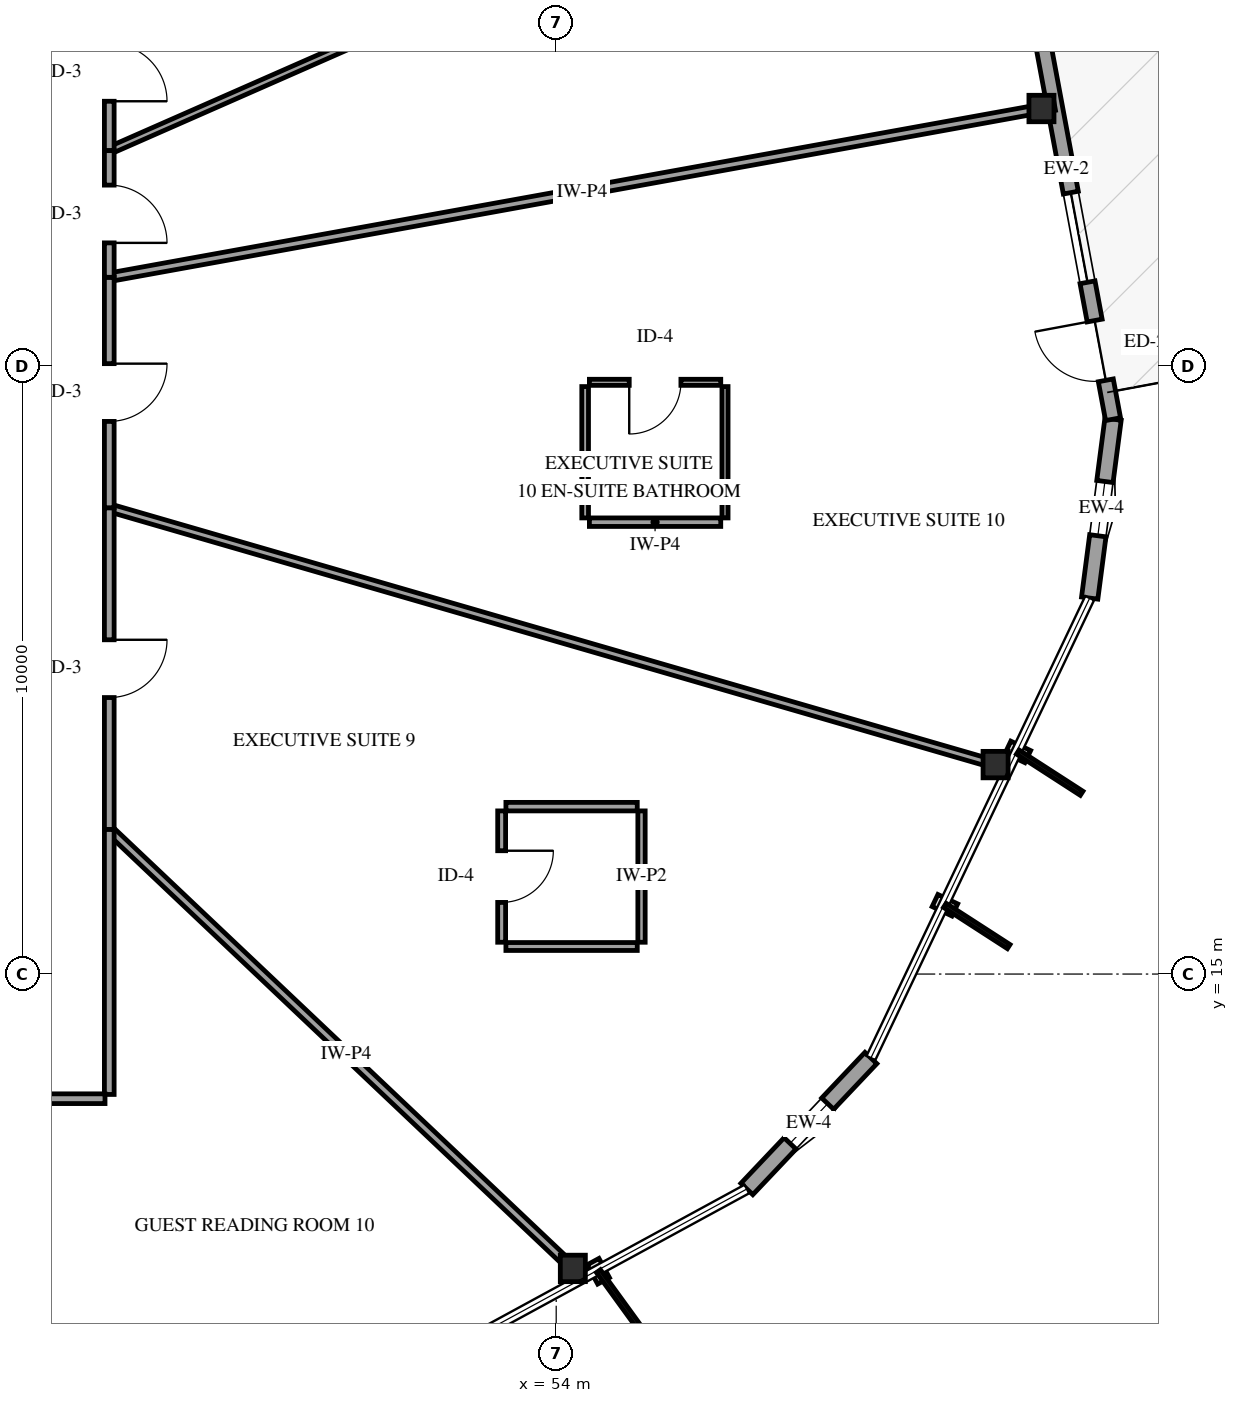
"""IFC4 building model, lengths in metres.
Left out: names, types, materials, properties, quantities, classifications, styles, units other than length and angle.
Written with IfcOpenShell. Run it as: python <this file> out.ifc"""

import sys

from ifc_helpers import new_model, si_unit, direction, frame, frame_2d, origin, origin_2d, place, context, subcontext, project, spatial, rectangle, i_section, extrude, element, fill, save


model = new_model("IFC4")
c1 = context("Model", 3, precision=1e-05, world=origin(), true_north=direction((0.0, 1.0)))
c2 = subcontext(c1, "Body", "Model", "MODEL_VIEW")
j1 = project(units=[si_unit("LENGTHUNIT", "METRE"), si_unit("PLANEANGLEUNIT", "RADIAN")], contexts=[c1])
p1 = place(None, origin())
s1 = spatial("IfcSite", under=j1, at=p1, CompositionType="ELEMENT")
p2 = place(p1, origin())
s2 = spatial("IfcBuilding", under=s1, at=p2, CompositionType="ELEMENT")
p3 = place(p2, frame((0.0, 0.0, 139.0)))
s3 = spatial("IfcBuildingStorey", under=s2, at=p3, CompositionType="ELEMENT", Elevation=139.0)
for number, where, z_axis, x_axis in (
    (1, (61.98, 29.234, -0.3), (0.0, 0.0, 1.0), (1.0, 0.0, 0.0)),
    (2, (54.274, 10.159, -0.3), (0.0, 0.0, 1.0), (1.0, 0.0, 0.0)),
    (3, (61.226, 18.444, -0.3), (0.0, 0.0, 1.0), (1.0, 0.0, 0.0)),
):
    element("IfcColumn", number, at=place(p3, frame(where, z_axis=z_axis, x_axis=x_axis)), inside=s3, PredefinedType="COLUMN", context=c2, shape_type="SweptSolid", body=[
        extrude(i_section(OverallWidth=0.412, OverallDepth=0.435, WebThickness=0.036, FlangeThickness=0.057, FilletRadius=0.038, at=origin_2d()), origin(), (0.0, 0.0, 1.0), 3.9),
    ])
p4 = place(p3, frame((57.135, 11.465, 0.0), z_axis=(0.0, 0.0, 1.0), x_axis=(0.687587127065, 0.726101881759, 0.0)))
e4 = element("IfcWall", 4, at=p4, inside=s3, PredefinedType="SOLIDWALL", context=c2, shape_type="SweptSolid", body=[
    extrude(rectangle(XDim=2.967, YDim=0.27, at=frame_2d((1.483, 0.0))), origin(), (0.0, 0.0, 1.0), 2.679),
])
p5 = place(p4, frame((1.033, 0.0, 0.75)))
e5 = element("IfcOpeningElement", 5, at=p5, cuts=e4, PredefinedType="OPENING", context=c2, shape_type="SweptSolid", body=[
    extrude(rectangle(XDim=0.9, YDim=1.5, at=frame_2d((0.45, 0.75))), frame((0.0, 0.145, 0.0), z_axis=(0.0, -1.0, 0.0), x_axis=(1.0, 0.0, 0.0)), (0.0, 0.0, 1.0), 0.29),
])
p6 = place(p3, frame((62.773, 21.183, 0.0), z_axis=(0.0, 0.0, 1.0), x_axis=(0.129532682457, 0.991575153065, 0.0)))
e6 = element("IfcWall", 6, at=p6, inside=s3, PredefinedType="SOLIDWALL", context=c2, shape_type="SweptSolid", body=[
    extrude(rectangle(XDim=2.967, YDim=0.27, at=frame_2d((1.483, 0.0))), origin(), (0.0, 0.0, 1.0), 2.679),
])
p7 = place(p6, frame((1.033, 0.0, 0.75)))
e7 = element("IfcOpeningElement", 7, at=p7, cuts=e6, PredefinedType="OPENING", context=c2, shape_type="SweptSolid", body=[
    extrude(rectangle(XDim=0.9, YDim=1.5, at=frame_2d((0.45, 0.75))), frame((0.0, 0.145, 0.0), z_axis=(0.0, -1.0, 0.0), x_axis=(1.0, 0.0, 0.0)), (0.0, 0.0, 1.0), 0.29),
])
p8 = place(p3, frame((63.158, 24.125, 0.0), z_axis=(0.0, 0.0, 1.0), x_axis=(-0.183274789928, 0.983061723076, 0.0)))
e8 = element("IfcWall", 8, at=p8, inside=s3, PredefinedType="SOLIDWALL", context=c2, shape_type="SweptSolid", body=[
    extrude(rectangle(XDim=8.376, YDim=0.25, at=frame_2d((4.188, 0.0))), origin(), (0.0, 0.0, 1.0), 2.679),
])
p9 = place(p8, frame((0.65, 0.0, 0.0)))
e9 = element("IfcOpeningElement", 9, at=p9, cuts=e8, PredefinedType="OPENING", context=c2, shape_type="SweptSolid", body=[
    extrude(rectangle(XDim=1.0, YDim=2.15, at=frame_2d((0.5, 1.075))), frame((0.0, 0.135, 0.0), z_axis=(0.0, -1.0, 0.0), x_axis=(1.0, 0.0, 0.0)), (0.0, 0.0, 1.0), 0.27),
])
p10 = place(p8, frame((2.29, 0.0, 0.72)))
e10 = element("IfcOpeningElement", 10, at=p10, cuts=e8, PredefinedType="OPENING", context=c2, shape_type="SweptSolid", body=[
    extrude(rectangle(XDim=1.5, YDim=1.7, at=frame_2d((0.75, 0.85))), frame((0.0, 0.135, 0.0), z_axis=(0.0, -1.0, 0.0), x_axis=(1.0, 0.0, 0.0)), (0.0, 0.0, 1.0), 0.27),
])
p11 = place(p3, frame((62.198, 29.273, 0.0), z_axis=(0.0, 0.0, 1.0), x_axis=(-0.98400313361, -0.178151152242, 0.0)))
e11 = element("IfcWall", 11, at=p11, inside=s3, PredefinedType="PARTITIONING", context=c2, shape_type="SweptSolid", body=[
    extrude(rectangle(XDim=15.801, YDim=0.14, at=frame_2d((7.9, 0.0))), origin(), (0.0, 0.0, 1.0), 2.595),
])
p12 = place(p3, frame((46.65, 22.668, 0.0), z_axis=(0.0, 0.0, 1.0), x_axis=(0.96049001592, -0.278314443244, 0.0)))
e12 = element("IfcWall", 12, at=p12, inside=s3, PredefinedType="PARTITIONING", context=c2, shape_type="SweptSolid", body=[
    extrude(rectangle(XDim=15.399, YDim=0.13, at=frame_2d((7.7, 0.0))), origin(), (0.0, 0.0, 1.0), 3.3),
])
p13 = place(p3, frame((46.65, 28.541, 0.0), z_axis=(0.0, 0.0, 1.0), x_axis=(0.915387028223, 0.402574947756, 0.0)))
e13 = element("IfcWall", 13, at=p13, inside=s3, PredefinedType="PARTITIONING", context=c2, shape_type="SweptSolid", body=[
    extrude(rectangle(XDim=15.097, YDim=0.12, at=frame_2d((7.549, 0.0))), origin(), (0.0, 0.0, 1.0), 3.3),
])
p14 = place(p3, frame((46.65, 17.377, 0.0), z_axis=(0.0, 0.0, 1.0), x_axis=(0.726136795553, -0.687550255722, 0.0)))
e14 = element("IfcWall", 14, at=p14, inside=s3, PredefinedType="PARTITIONING", context=c2, shape_type="SweptSolid", body=[
    extrude(rectangle(XDim=10.731, YDim=0.14, at=frame_2d((5.365, 0.0))), origin(), (0.0, 0.0, 1.0), 2.595),
])
p15 = place(p3, frame((46.65, 22.668, 0.0), z_axis=(0.0, 0.0, 1.0), x_axis=(0.0, -1.0, 0.0)))
e15 = element("IfcWall", 15, at=p15, inside=s3, PredefinedType="PARTITIONING", context=c2, shape_type="SweptSolid", body=[
    extrude(rectangle(XDim=5.291, YDim=0.16, at=frame_2d((2.646, 0.0))), origin(), (0.0, 0.0, 1.0), 3.3),
])
p16 = place(p15, frame((2.171, 0.0, 0.0)))
e16 = element("IfcOpeningElement", 16, at=p16, cuts=e15, PredefinedType="OPENING", context=c2, shape_type="SweptSolid", body=[
    extrude(rectangle(XDim=0.95, YDim=2.15, at=frame_2d((0.475, 1.075))), frame((0.0, 0.09, 0.0), z_axis=(0.0, -1.0, 0.0), x_axis=(1.0, 0.0, 0.0)), (0.0, 0.0, 1.0), 0.18),
])
p17 = place(p3, frame((46.65, 17.377, 0.0), z_axis=(0.0, 0.0, 1.0), x_axis=(0.0, -1.0, 0.0)))
e17 = element("IfcWall", 17, at=p17, inside=s3, PredefinedType="PARTITIONING", context=c2, shape_type="SweptSolid", body=[
    extrude(rectangle(XDim=4.357, YDim=0.16, at=frame_2d((2.178, 0.0))), origin(), (0.0, 0.0, 1.0), 3.3),
])
p18 = place(p3, frame((46.65, 26.458, 0.0), z_axis=(0.0, 0.0, 1.0), x_axis=(0.0, -1.0, 0.0)))
e18 = element("IfcWall", 18, at=p18, inside=s3, PredefinedType="PARTITIONING", context=c2, shape_type="SweptSolid", body=[
    extrude(rectangle(XDim=3.79, YDim=0.16, at=frame_2d((1.895, 0.0))), origin(), (0.0, 0.0, 1.0), 3.3),
])
p19 = place(p18, frame((1.42, 0.0, 0.0)))
e19 = element("IfcOpeningElement", 19, at=p19, cuts=e18, PredefinedType="OPENING", context=c2, shape_type="SweptSolid", body=[
    extrude(rectangle(XDim=0.95, YDim=2.15, at=frame_2d((0.475, 1.075))), frame((0.0, 0.09, 0.0), z_axis=(0.0, -1.0, 0.0), x_axis=(1.0, 0.0, 0.0)), (0.0, 0.0, 1.0), 0.18),
])
p20 = place(p3, frame((46.58, 12.95, 0.0), z_axis=(0.0, 0.0, 1.0), x_axis=(-1.0, 0.0, 0.0)))
e20 = element("IfcWall", 20, at=p20, inside=s3, PredefinedType="PARTITIONING", context=c2, shape_type="SweptSolid", body=[
    extrude(rectangle(XDim=3.31, YDim=0.16, at=frame_2d((1.655, 0.0))), origin(), (0.0, 0.0, 1.0), 3.3),
])
p21 = place(p3, frame((46.65, 31.115, 0.0), z_axis=(0.0, 0.0, 1.0), x_axis=(0.0, -1.0, 0.0)))
e21 = element("IfcWall", 21, at=p21, inside=s3, PredefinedType="PARTITIONING", context=c2, shape_type="SweptSolid", body=[
    extrude(rectangle(XDim=2.574, YDim=0.16, at=frame_2d((1.287, 0.0))), origin(), (0.0, 0.0, 1.0), 3.3),
])
p22 = place(p21, frame((0.812, 0.0, 0.0)))
e22 = element("IfcOpeningElement", 22, at=p22, cuts=e21, PredefinedType="OPENING", context=c2, shape_type="SweptSolid", body=[
    extrude(rectangle(XDim=0.95, YDim=2.15, at=frame_2d((0.475, 1.075))), frame((0.0, 0.09, 0.0), z_axis=(0.0, -1.0, 0.0), x_axis=(1.0, 0.0, 0.0)), (0.0, 0.0, 1.0), 0.18),
])
p23 = place(p3, frame((56.706, 24.731, 0.0), z_axis=(0.0, 0.0, 1.0), x_axis=(-1.0, 0.0, 0.0)))
e23 = element("IfcWall", 23, at=p23, inside=s3, PredefinedType="PARTITIONING", context=c2, shape_type="SweptSolid", body=[
    extrude(rectangle(XDim=2.16, YDim=0.1, at=frame_2d((1.08, 0.0))), origin(), (0.0, 0.0, 1.0), 3.3),
])
p24 = place(p23, frame((0.655, 0.0, 0.0)))
e24 = element("IfcOpeningElement", 24, at=p24, cuts=e23, PredefinedType="OPENING", context=c2, shape_type="SweptSolid", body=[
    extrude(rectangle(XDim=0.85, YDim=2.1, at=frame_2d((0.425, 1.05))), frame((0.0, 0.06, 0.0), z_axis=(0.0, -1.0, 0.0), x_axis=(1.0, 0.0, 0.0)), (0.0, 0.0, 1.0), 0.12),
])
p25 = place(p3, frame((54.546, 22.431, 0.0), z_axis=(0.0, 0.0, 1.0), x_axis=(1.0, 0.0, 0.0)))
e25 = element("IfcWall", 25, at=p25, inside=s3, PredefinedType="PARTITIONING", context=c2, shape_type="SweptSolid", body=[
    extrude(rectangle(XDim=2.16, YDim=0.14, at=frame_2d((1.08, 0.0))), origin(), (0.0, 0.0, 1.0), 3.3),
])
p26 = place(p3, frame((53.103, 17.683, 0.0), z_axis=(0.0, 0.0, 1.0), x_axis=(0.0, -1.0, 0.0)))
e26 = element("IfcWall", 26, at=p26, inside=s3, PredefinedType="PARTITIONING", context=c2, shape_type="SweptSolid", body=[
    extrude(rectangle(XDim=2.16, YDim=0.13, at=frame_2d((1.08, 0.0))), origin(), (0.0, 0.0, 1.0), 3.3),
])
p27 = place(p26, frame((0.655, 0.0, 0.0)))
e27 = element("IfcOpeningElement", 27, at=p27, cuts=e26, PredefinedType="OPENING", context=c2, shape_type="SweptSolid", body=[
    extrude(rectangle(XDim=0.85, YDim=2.1, at=frame_2d((0.425, 1.05))), frame((0.0, 0.075, 0.0), z_axis=(0.0, -1.0, 0.0), x_axis=(1.0, 0.0, 0.0)), (0.0, 0.0, 1.0), 0.15),
])
p28 = place(p3, frame((55.403, 15.523, 0.0), z_axis=(0.0, 0.0, 1.0), x_axis=(0.0, 1.0, 0.0)))
e28 = element("IfcWall", 28, at=p28, inside=s3, PredefinedType="PARTITIONING", context=c2, shape_type="SweptSolid", body=[
    extrude(rectangle(XDim=2.16, YDim=0.12, at=frame_2d((1.08, 0.0))), origin(), (0.0, 0.0, 1.0), 3.3),
])
p29 = place(p3, frame((54.476, 24.661, 0.0), z_axis=(0.0, 0.0, 1.0), x_axis=(0.0, -1.0, 0.0)))
e29 = element("IfcWall", 29, at=p29, inside=s3, PredefinedType="PARTITIONING", context=c2, shape_type="SweptSolid", body=[
    extrude(rectangle(XDim=2.16, YDim=0.11, at=frame_2d((1.08, 0.0))), origin(), (0.0, 0.0, 1.0), 3.3),
])
p30 = place(p3, frame((56.776, 22.501, 0.0), z_axis=(0.0, 0.0, 1.0), x_axis=(0.0, 1.0, 0.0)))
e30 = element("IfcWall", 30, at=p30, inside=s3, PredefinedType="PARTITIONING", context=c2, shape_type="SweptSolid", body=[
    extrude(rectangle(XDim=2.16, YDim=0.1, at=frame_2d((1.08, 0.0))), origin(), (0.0, 0.0, 1.0), 3.3),
])
p31 = place(p3, frame((55.333, 17.753, 0.0), z_axis=(0.0, 0.0, 1.0), x_axis=(-1.0, 0.0, 0.0)))
e31 = element("IfcWall", 31, at=p31, inside=s3, PredefinedType="PARTITIONING", context=c2, shape_type="SweptSolid", body=[
    extrude(rectangle(XDim=2.16, YDim=0.14, at=frame_2d((1.08, 0.0))), origin(), (0.0, 0.0, 1.0), 3.3),
])
p32 = place(p3, frame((53.173, 15.453, 0.0), z_axis=(0.0, 0.0, 1.0), x_axis=(1.0, 0.0, 0.0)))
e32 = element("IfcWall", 32, at=p32, inside=s3, PredefinedType="PARTITIONING", context=c2, shape_type="SweptSolid", body=[
    extrude(rectangle(XDim=2.16, YDim=0.13, at=frame_2d((1.08, 0.0))), origin(), (0.0, 0.0, 1.0), 3.3),
])
p33 = place(p3, frame((46.65, 28.541, 0.0), z_axis=(0.0, 0.0, 1.0), x_axis=(0.0, -1.0, 0.0)))
e33 = element("IfcWall", 33, at=p33, inside=s3, PredefinedType="PARTITIONING", context=c2, shape_type="SweptSolid", body=[
    extrude(rectangle(XDim=2.083, YDim=0.16, at=frame_2d((1.042, 0.0))), origin(), (0.0, 0.0, 1.0), 3.3),
])
p34 = place(p33, frame((0.567, 0.0, 0.0)))
e34 = element("IfcOpeningElement", 34, at=p34, cuts=e33, PredefinedType="OPENING", context=c2, shape_type="SweptSolid", body=[
    extrude(rectangle(XDim=0.95, YDim=2.15, at=frame_2d((0.475, 1.075))), frame((0.0, 0.09, 0.0), z_axis=(0.0, -1.0, 0.0), x_axis=(1.0, 0.0, 0.0)), (0.0, 0.0, 1.0), 0.18),
])
p35 = place(p5, origin())
e35 = element("IfcWindow", 35, at=p35, inside=s3, PartitioningType="SINGLE_PANEL", PredefinedType="WINDOW", context=c2, shape_type="SweptSolid", body=[
    extrude(rectangle(XDim=0.9, YDim=1.5, at=frame_2d((0.45, 0.75))), frame((0.0, 0.03, 0.0), z_axis=(0.0, -1.0, 0.0), x_axis=(1.0, 0.0, 0.0)), (0.0, 0.0, 1.0), 0.06),
])
fill(e5, e35)
p36 = place(p7, origin())
e36 = element("IfcWindow", 36, at=p36, inside=s3, PartitioningType="SINGLE_PANEL", PredefinedType="WINDOW", context=c2, shape_type="SweptSolid", body=[
    extrude(rectangle(XDim=0.9, YDim=1.5, at=frame_2d((0.45, 0.75))), frame((0.0, 0.03, 0.0), z_axis=(0.0, -1.0, 0.0), x_axis=(1.0, 0.0, 0.0)), (0.0, 0.0, 1.0), 0.06),
])
fill(e7, e36)
p37 = place(p9, origin())
e37 = element("IfcDoor", 37, at=p37, inside=s3, OperationType="SINGLE_SWING_RIGHT", PredefinedType="DOOR", context=c2, shape_type="SweptSolid", body=[
    extrude(rectangle(XDim=1.0, YDim=2.15, at=frame_2d((0.5, 1.075))), frame((0.0, 0.025, 0.0), z_axis=(0.0, -1.0, 0.0), x_axis=(1.0, 0.0, 0.0)), (0.0, 0.0, 1.0), 0.05),
])
fill(e9, e37)
p38 = place(p10, origin())
e38 = element("IfcWindow", 38, at=p38, inside=s3, PartitioningType="SINGLE_PANEL", PredefinedType="WINDOW", context=c2, shape_type="SweptSolid", body=[
    extrude(rectangle(XDim=1.5, YDim=1.7, at=frame_2d((0.75, 0.85))), frame((0.0, 0.03, 0.0), z_axis=(0.0, -1.0, 0.0), x_axis=(1.0, 0.0, 0.0)), (0.0, 0.0, 1.0), 0.06),
])
fill(e10, e38)
p39 = place(p16, origin())
e39 = element("IfcDoor", 39, at=p39, inside=s3, OperationType="SINGLE_SWING_LEFT", PredefinedType="DOOR", context=c2, shape_type="SweptSolid", body=[
    extrude(rectangle(XDim=0.95, YDim=2.15, at=frame_2d((0.475, 1.075))), frame((0.0, 0.025, 0.0), z_axis=(0.0, -1.0, 0.0), x_axis=(1.0, 0.0, 0.0)), (0.0, 0.0, 1.0), 0.05),
])
fill(e16, e39)
p40 = place(p19, origin())
e40 = element("IfcDoor", 40, at=p40, inside=s3, OperationType="SINGLE_SWING_LEFT", PredefinedType="DOOR", context=c2, shape_type="SweptSolid", body=[
    extrude(rectangle(XDim=0.95, YDim=2.15, at=frame_2d((0.475, 1.075))), frame((0.0, 0.025, 0.0), z_axis=(0.0, -1.0, 0.0), x_axis=(1.0, 0.0, 0.0)), (0.0, 0.0, 1.0), 0.05),
])
fill(e19, e40)
p41 = place(p22, origin())
e41 = element("IfcDoor", 41, at=p41, inside=s3, OperationType="SINGLE_SWING_RIGHT", PredefinedType="DOOR", context=c2, shape_type="SweptSolid", body=[
    extrude(rectangle(XDim=0.95, YDim=2.15, at=frame_2d((0.475, 1.075))), frame((0.0, 0.025, 0.0), z_axis=(0.0, -1.0, 0.0), x_axis=(1.0, 0.0, 0.0)), (0.0, 0.0, 1.0), 0.05),
])
fill(e22, e41)
p42 = place(p24, origin())
e42 = element("IfcDoor", 42, at=p42, inside=s3, OperationType="SINGLE_SWING_RIGHT", PredefinedType="DOOR", context=c2, shape_type="SweptSolid", body=[
    extrude(rectangle(XDim=0.85, YDim=2.1, at=frame_2d((0.425, 1.05))), frame((0.0, 0.025, 0.0), z_axis=(0.0, -1.0, 0.0), x_axis=(1.0, 0.0, 0.0)), (0.0, 0.0, 1.0), 0.05),
])
fill(e24, e42)
p43 = place(p27, origin())
e43 = element("IfcDoor", 43, at=p43, inside=s3, OperationType="SINGLE_SWING_LEFT", PredefinedType="DOOR", context=c2, shape_type="SweptSolid", body=[
    extrude(rectangle(XDim=0.85, YDim=2.1, at=frame_2d((0.425, 1.05))), frame((0.0, 0.025, 0.0), z_axis=(0.0, -1.0, 0.0), x_axis=(1.0, 0.0, 0.0)), (0.0, 0.0, 1.0), 0.05),
])
fill(e27, e43)
p44 = place(p34, origin())
e44 = element("IfcDoor", 44, at=p44, inside=s3, OperationType="SINGLE_SWING_RIGHT", PredefinedType="DOOR", context=c2, shape_type="SweptSolid", body=[
    extrude(rectangle(XDim=0.95, YDim=2.15, at=frame_2d((0.475, 1.075))), frame((0.0, 0.025, 0.0), z_axis=(0.0, -1.0, 0.0), x_axis=(1.0, 0.0, 0.0)), (0.0, 0.0, 1.0), 0.05),
])
fill(e34, e44)
save(model, sys.argv[1])
